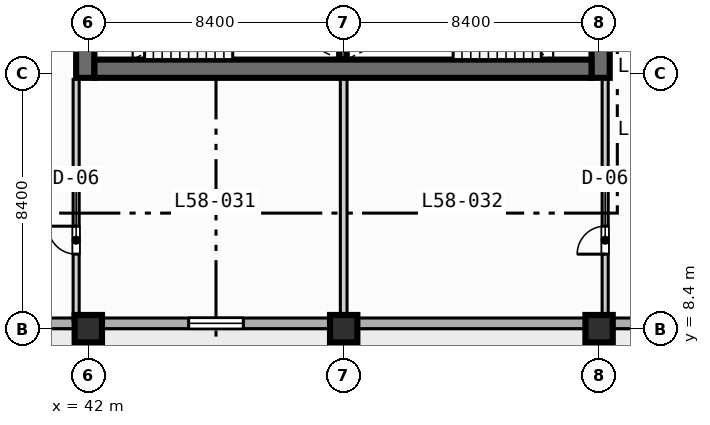
"""IFC4 building model, lengths in metres.
Left out: names, types, materials, properties, quantities, classifications, styles, units other than length and angle.
Written with IfcOpenShell. Run it as: python <this file> out.ifc"""

import sys

from ifc_helpers import new_model, si_unit, direction, frame, frame_2d, origin, origin_2d, place, context, subcontext, project, spatial, rectangle, extrude, element, fill, save


model = new_model("IFC4")
c1 = context("Model", 3, precision=1e-05, world=origin(), true_north=direction((0.0, 1.0)))
c2 = subcontext(c1, "Body", "Model", "MODEL_VIEW")
j1 = project(units=[si_unit("LENGTHUNIT", "METRE"), si_unit("PLANEANGLEUNIT", "RADIAN")], contexts=[c1])
p1 = place(None, origin())
s1 = spatial("IfcSite", under=j1, at=p1, CompositionType="ELEMENT")
p2 = place(p1, origin())
s2 = spatial("IfcBuilding", under=s1, at=p2, CompositionType="ELEMENT")
p3 = place(p2, frame((0.0, 0.0, 237.9)))
s3 = spatial("IfcBuildingStorey", under=s2, at=p3, CompositionType="ELEMENT", Elevation=237.9)
p4 = place(p3, frame((50.375, 17.25, 0.0), z_axis=(0.0, 0.0, 1.0), x_axis=(0.0, 1.0, 0.0)))
e1 = element("IfcWall", 1, at=p4, inside=s3, PredefinedType="SOLIDWALL", context=c2, shape_type="SweptSolid", body=[
    extrude(rectangle(XDim=3.5, YDim=0.25, at=frame_2d((1.75, 0.0))), origin(), (0.0, 0.0, 1.0), 3.47),
])
for number, where, z_axis, x_axis in (
    (2, (41.9, 16.65, 0.0), (0.0, 0.0, 1.0), (0.0, 1.0, 0.0)),
    (3, (58.85, 16.65, 0.0), (0.0, 0.0, 1.0), (0.0, 1.0, 0.0)),
):
    element("IfcWall", number, at=place(p3, frame(where, z_axis=z_axis, x_axis=x_axis)), inside=s3, PredefinedType="SHEAR", context=c2, shape_type="SweptSolid", body=[
        extrude(rectangle(XDim=1.35, YDim=0.6, at=frame_2d((0.675, 0.0))), origin(), (0.0, 0.0, 1.0), 3.47),
    ])
p5 = place(p3, frame((42.2, 16.95, 0.0), z_axis=(0.0, 0.0, 1.0), x_axis=(1.0, 0.0, 0.0)))
e4 = element("IfcWall", 4, at=p5, inside=s3, PredefinedType="SHEAR", context=c2, shape_type="SweptSolid", body=[
    extrude(rectangle(XDim=16.35, YDim=0.6, at=frame_2d((8.175, 0.0))), origin(), (0.0, 0.0, 1.0), 3.47),
])
for number, where, z_axis, x_axis in (
    (5, (42.0, 8.4, 0.0), (0.0, 0.0, 1.0), (1.0, 0.0, 0.0)),
    (6, (50.4, 8.4, 0.0), (0.0, 0.0, 1.0), (1.0, 0.0, 0.0)),
    (7, (58.8, 8.4, 0.0), (0.0, 0.0, 1.0), (1.0, 0.0, 0.0)),
):
    element("IfcColumn", number, at=place(p3, frame(where, z_axis=z_axis, x_axis=x_axis)), inside=s3, PredefinedType="COLUMN", context=c2, shape_type="SweptSolid", body=[
        extrude(rectangle(XDim=0.9, YDim=0.9, at=origin_2d()), origin(), (0.0, 0.0, 1.0), 3.7),
    ])
p6 = place(p3, frame((72.425, 8.575, 0.0), z_axis=(0.0, 0.0, 1.0), x_axis=(-1.0, 0.0, 0.0)))
e8 = element("IfcWall", 8, at=p6, inside=s3, PredefinedType="STANDARD", context=c2, shape_type="SweptSolid", body=[
    extrude(rectangle(XDim=60.85, YDim=0.35, at=frame_2d((30.425, 0.0))), origin(), (0.0, 0.0, 1.0), 3.47),
])
p7 = place(p6, frame((43.325, 0.0, 0.0)))
e9 = element("IfcOpeningElement", 9, at=p7, cuts=e8, PredefinedType="OPENING", context=c2, shape_type="SweptSolid", body=[
    extrude(rectangle(XDim=1.4, YDim=2.2, at=frame_2d((0.7, 1.1))), frame((0.0, 0.185, 0.0), z_axis=(0.0, -1.0, 0.0), x_axis=(1.0, 0.0, 0.0)), (0.0, 0.0, 1.0), 0.37),
])
p8 = place(p6, frame((33.425, 0.0, 0.85)))
e10 = element("IfcOpeningElement", 10, at=p8, cuts=e8, PredefinedType="OPENING", context=c2, shape_type="SweptSolid", body=[
    extrude(rectangle(XDim=2.4, YDim=1.95, at=frame_2d((1.2, 0.975))), frame((0.0, 0.185, 0.0), z_axis=(0.0, -1.0, 0.0), x_axis=(1.0, 0.0, 0.0)), (0.0, 0.0, 1.0), 0.37),
])
p9 = place(p6, frame((25.325, 0.0, 0.85)))
e11 = element("IfcOpeningElement", 11, at=p9, cuts=e8, PredefinedType="OPENING", context=c2, shape_type="SweptSolid", body=[
    extrude(rectangle(XDim=1.8, YDim=1.8, at=frame_2d((0.9, 0.9))), frame((0.0, 0.185, 0.0), z_axis=(0.0, -1.0, 0.0), x_axis=(1.0, 0.0, 0.0)), (0.0, 0.0, 1.0), 0.37),
])
p10 = place(p6, frame((56.325, 0.0, 0.85)))
e12 = element("IfcOpeningElement", 12, at=p10, cuts=e8, PredefinedType="OPENING", context=c2, shape_type="SweptSolid", body=[
    extrude(rectangle(XDim=1.8, YDim=1.8, at=frame_2d((0.9, 0.9))), frame((0.0, 0.185, 0.0), z_axis=(0.0, -1.0, 0.0), x_axis=(1.0, 0.0, 0.0)), (0.0, 0.0, 1.0), 0.37),
])
p11 = place(p3, frame((41.6, 8.65, 0.0), z_axis=(0.0, 0.0, 1.0), x_axis=(0.0, 1.0, 0.0)))
e13 = element("IfcWall", 13, at=p11, inside=s3, PredefinedType="PARTITIONING", context=c2, shape_type="SweptSolid", body=[
    extrude(rectangle(XDim=7.95, YDim=0.2, at=frame_2d((3.975, 0.0))), origin(), (0.0, 0.0, 1.0), 3.47),
])
p12 = place(p11, frame((2.2, 0.0, 0.0)))
e14 = element("IfcOpeningElement", 14, at=p12, cuts=e13, PredefinedType="OPENING", context=c2, shape_type="SweptSolid", body=[
    extrude(rectangle(XDim=0.92, YDim=2.1, at=frame_2d((0.46, 1.05))), frame((0.0, 0.11, 0.0), z_axis=(0.0, -1.0, 0.0), x_axis=(1.0, 0.0, 0.0)), (0.0, 0.0, 1.0), 0.22),
])
p13 = place(p3, frame((59.0, 8.65, 0.0), z_axis=(0.0, 0.0, 1.0), x_axis=(0.0, 1.0, 0.0)))
e15 = element("IfcWall", 15, at=p13, inside=s3, PredefinedType="PARTITIONING", context=c2, shape_type="SweptSolid", body=[
    extrude(rectangle(XDim=7.95, YDim=0.2, at=frame_2d((3.975, 0.0))), origin(), (0.0, 0.0, 1.0), 3.16),
])
p14 = place(p13, frame((2.2, 0.0, 0.0)))
e16 = element("IfcOpeningElement", 16, at=p14, cuts=e15, PredefinedType="OPENING", context=c2, shape_type="SweptSolid", body=[
    extrude(rectangle(XDim=0.92, YDim=2.1, at=frame_2d((0.46, 1.05))), frame((0.0, 0.11, 0.0), z_axis=(0.0, -1.0, 0.0), x_axis=(1.0, 0.0, 0.0)), (0.0, 0.0, 1.0), 0.22),
])
p15 = place(p3, frame((50.4, 8.65, 0.0), z_axis=(0.0, 0.0, 1.0), x_axis=(0.0, 1.0, 0.0)))
e17 = element("IfcWall", 17, at=p15, inside=s3, PredefinedType="PARTITIONING", context=c2, shape_type="SweptSolid", body=[
    extrude(rectangle(XDim=7.95, YDim=0.22, at=frame_2d((3.975, 0.0))), origin(), (0.0, 0.0, 1.0), 2.82),
])
p16 = place(p9, origin())
e18 = element("IfcWindow", 18, at=p16, inside=s3, PartitioningType="SINGLE_PANEL", PredefinedType="WINDOW", context=c2, shape_type="SweptSolid", body=[
    extrude(rectangle(XDim=1.8, YDim=1.8, at=frame_2d((0.9, 0.9))), frame((0.0, 0.03, 0.0), z_axis=(0.0, -1.0, 0.0), x_axis=(1.0, 0.0, 0.0)), (0.0, 0.0, 1.0), 0.06),
])
fill(e11, e18)
p17 = place(p12, origin())
e19 = element("IfcDoor", 19, at=p17, inside=s3, OperationType="SINGLE_SWING_RIGHT", PredefinedType="DOOR", context=c2, shape_type="SweptSolid", body=[
    extrude(rectangle(XDim=0.92, YDim=2.1, at=frame_2d((0.46, 1.05))), frame((0.0, 0.025, 0.0), z_axis=(0.0, -1.0, 0.0), x_axis=(1.0, 0.0, 0.0)), (0.0, 0.0, 1.0), 0.05),
])
fill(e14, e19)
p18 = place(p14, origin())
e20 = element("IfcDoor", 20, at=p18, inside=s3, OperationType="SINGLE_SWING_LEFT", PredefinedType="DOOR", context=c2, shape_type="SweptSolid", body=[
    extrude(rectangle(XDim=0.92, YDim=2.1, at=frame_2d((0.46, 1.05))), frame((0.0, 0.025, 0.0), z_axis=(0.0, -1.0, 0.0), x_axis=(1.0, 0.0, 0.0)), (0.0, 0.0, 1.0), 0.05),
])
fill(e16, e20)
save(model, sys.argv[1])
